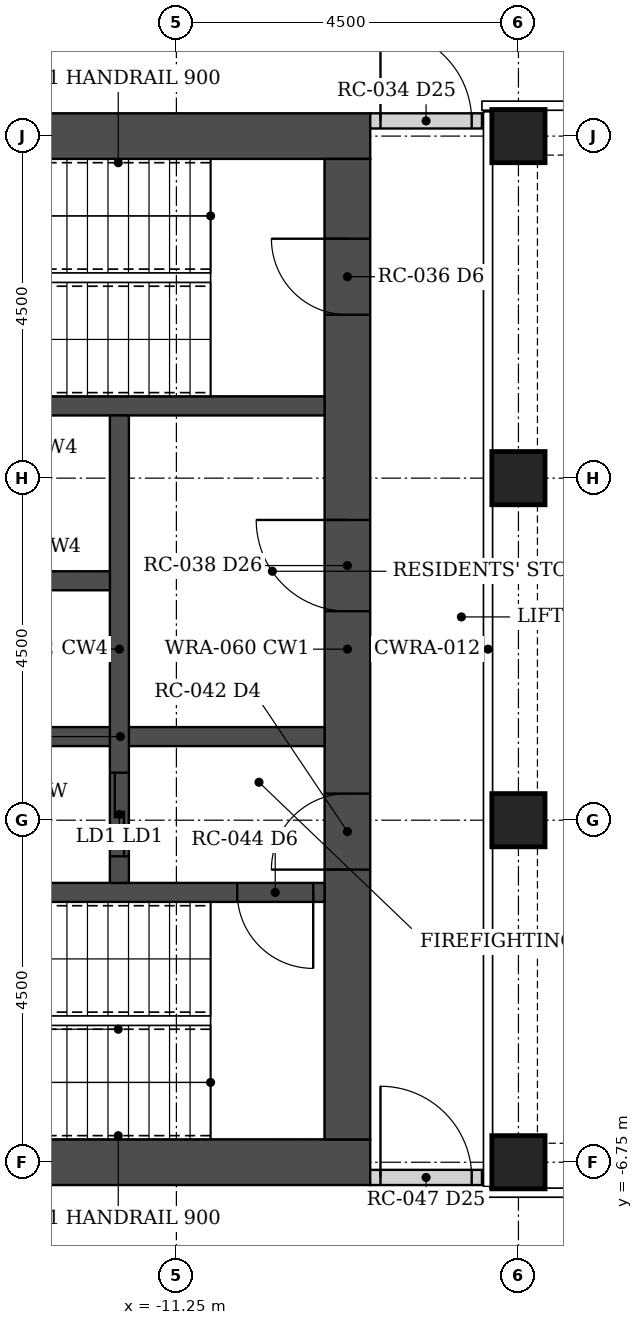
"""IFC4 building model, lengths in metres.
Left out: names, types, materials, properties, quantities, classifications, styles, units other than length and angle.
Written with IfcOpenShell. Run it as: python <this file> out.ifc"""

import sys

from ifc_helpers import new_model, si_unit, direction, frame, frame_2d, origin, origin_2d, place, context, subcontext, project, spatial, rectangle, hollow_rectangle, extrude, element, fill, save


model = new_model("IFC4")
c1 = context("Model", 3, precision=1e-05, world=origin(), true_north=direction((0.0, 1.0)))
c2 = subcontext(c1, "Body", "Model", "MODEL_VIEW")
j1 = project(units=[si_unit("LENGTHUNIT", "METRE"), si_unit("PLANEANGLEUNIT", "RADIAN")], contexts=[c1])
p1 = place(None, origin())
s1 = spatial("IfcSite", under=j1, at=p1, CompositionType="ELEMENT")
p2 = place(p1, origin())
s2 = spatial("IfcBuilding", under=s1, at=p2, CompositionType="ELEMENT")
p3 = place(p2, frame((0.0, 0.0, 47.5)))
s3 = spatial("IfcBuildingStorey", under=s2, at=p3, CompositionType="ELEMENT", Elevation=47.5)
for number, where, z_axis, x_axis in (
    (1, (-6.75, -6.75, 0.0), (0.0, 0.0, 1.0), (1.0, 0.0, 0.0)),
    (2, (-6.75, -2.25, 0.0), (0.0, 0.0, 1.0), (1.0, 0.0, 0.0)),
    (3, (-6.75, 2.25, 0.0), (0.0, 0.0, 1.0), (1.0, 0.0, 0.0)),
    (4, (-6.75, 6.75, 0.0), (0.0, 0.0, 1.0), (1.0, 0.0, 0.0)),
):
    element("IfcColumn", number, at=place(p3, frame(where, z_axis=z_axis, x_axis=x_axis)), inside=s3, PredefinedType="COLUMN", context=c2, shape_type="SweptSolid", body=[
        extrude(hollow_rectangle(XDim=0.7, YDim=0.7, WallThickness=0.06, at=origin_2d()), origin(), (0.0, 0.0, 1.0), 3.5),
    ])
for number, where, z_axis, x_axis in (
    (5, (-8.7, -6.75, 0.0), (0.0, 0.0, 1.0), (-1.0, 0.0, 0.0)),
    (6, (-8.7, 6.75, 0.0), (0.0, 0.0, 1.0), (-1.0, 0.0, 0.0)),
):
    element("IfcWall", number, at=place(p3, frame(where, z_axis=z_axis, x_axis=x_axis)), inside=s3, PredefinedType="SHEAR", context=c2, shape_type="SweptSolid", body=[
        extrude(rectangle(XDim=9.6, YDim=0.6, at=frame_2d((4.8, 0.0))), origin(), (0.0, 0.0, 1.0), 3.5),
    ])
p4 = place(p3, frame((-9.0, -6.45, 0.0), z_axis=(0.0, 0.0, 1.0), x_axis=(0.0, 1.0, 0.0)))
e7 = element("IfcWall", 7, at=p4, inside=s3, PredefinedType="SHEAR", context=c2, shape_type="SweptSolid", body=[
    extrude(rectangle(XDim=12.9, YDim=0.6, at=frame_2d((6.45, 0.0))), origin(), (0.0, 0.0, 1.0), 3.5),
])
p5 = place(p4, frame((3.55, 0.0, 0.0)))
e8 = element("IfcOpeningElement", 8, at=p5, cuts=e7, PredefinedType="OPENING", context=c2, shape_type="SweptSolid", body=[
    extrude(rectangle(XDim=1.0, YDim=2.1, at=frame_2d((0.5, 1.05))), frame((0.0, 0.31, 0.0), z_axis=(0.0, -1.0, 0.0), x_axis=(1.0, 0.0, 0.0)), (0.0, 0.0, 1.0), 0.62),
])
p6 = place(p4, frame((6.95, 0.0, 0.0)))
e9 = element("IfcOpeningElement", 9, at=p6, cuts=e7, PredefinedType="OPENING", context=c2, shape_type="SweptSolid", body=[
    extrude(rectangle(XDim=1.2, YDim=2.1, at=frame_2d((0.6, 1.05))), frame((0.0, 0.31, 0.0), z_axis=(0.0, -1.0, 0.0), x_axis=(1.0, 0.0, 0.0)), (0.0, 0.0, 1.0), 0.62),
])
p7 = place(p4, frame((10.85, 0.0, 0.0)))
e10 = element("IfcOpeningElement", 10, at=p7, cuts=e7, PredefinedType="OPENING", context=c2, shape_type="SweptSolid", body=[
    extrude(rectangle(XDim=1.0, YDim=2.1, at=frame_2d((0.5, 1.05))), frame((0.0, 0.31, 0.0), z_axis=(0.0, -1.0, 0.0), x_axis=(1.0, 0.0, 0.0)), (0.0, 0.0, 1.0), 0.62),
])
p8 = place(p3, frame((-9.3, -3.2, 0.0), z_axis=(0.0, 0.0, 1.0), x_axis=(-1.0, 0.0, 0.0)))
e11 = element("IfcWall", 11, at=p8, inside=s3, PredefinedType="SHEAR", context=c2, shape_type="SweptSolid", body=[
    extrude(rectangle(XDim=8.4, YDim=0.25, at=frame_2d((4.2, 0.0))), origin(), (0.0, 0.0, 1.0), 3.5),
])
p9 = place(p8, frame((0.15, 0.0, 0.0)))
e12 = element("IfcOpeningElement", 12, at=p9, cuts=e11, PredefinedType="OPENING", context=c2, shape_type="SweptSolid", body=[
    extrude(rectangle(XDim=1.0, YDim=2.1, at=frame_2d((0.5, 1.05))), frame((0.0, 0.135, 0.0), z_axis=(0.0, -1.0, 0.0), x_axis=(1.0, 0.0, 0.0)), (0.0, 0.0, 1.0), 0.27),
])
p10 = place(p3, frame((-9.3, 3.2, 0.0), z_axis=(0.0, 0.0, 1.0), x_axis=(-1.0, 0.0, 0.0)))
e13 = element("IfcWall", 13, at=p10, inside=s3, PredefinedType="SHEAR", context=c2, shape_type="SweptSolid", body=[
    extrude(rectangle(XDim=8.4, YDim=0.25, at=frame_2d((4.2, 0.0))), origin(), (0.0, 0.0, 1.0), 3.5),
])
p11 = place(p3, frame((-9.3, -1.15, 0.0), z_axis=(0.0, 0.0, 1.0), x_axis=(-1.0, 0.0, 0.0)))
e14 = element("IfcWall", 14, at=p11, inside=s3, PredefinedType="SHEAR", context=c2, shape_type="SweptSolid", body=[
    extrude(rectangle(XDim=5.375, YDim=0.25, at=frame_2d((2.688, 0.0))), origin(), (0.0, 0.0, 1.0), 3.5),
])
p12 = place(p3, frame((-12.0, -3.075, 0.0), z_axis=(0.0, 0.0, 1.0), x_axis=(0.0, 1.0, 0.0)))
e15 = element("IfcWall", 15, at=p12, inside=s3, PredefinedType="SHEAR", context=c2, shape_type="SweptSolid", body=[
    extrude(rectangle(XDim=6.15, YDim=0.25, at=frame_2d((3.075, 0.0))), origin(), (0.0, 0.0, 1.0), 3.5),
])
p13 = place(p12, frame((0.35, 0.0, 0.0)))
e16 = element("IfcOpeningElement", 16, at=p13, cuts=e15, PredefinedType="OPENING", context=c2, shape_type="SweptSolid", body=[
    extrude(rectangle(XDim=1.1, YDim=2.1, at=frame_2d((0.55, 1.05))), frame((0.0, 0.135, 0.0), z_axis=(0.0, -1.0, 0.0), x_axis=(1.0, 0.0, 0.0)), (0.0, 0.0, 1.0), 0.27),
])
p14 = place(p3, frame((-12.125, 0.9, 0.0), z_axis=(0.0, 0.0, 1.0), x_axis=(-1.0, 0.0, 0.0)))
e17 = element("IfcWall", 17, at=p14, inside=s3, PredefinedType="SHEAR", context=c2, shape_type="SweptSolid", body=[
    extrude(rectangle(XDim=2.55, YDim=0.25, at=frame_2d((1.275, 0.0))), origin(), (0.0, 0.0, 1.0), 3.5),
])
p15 = place(p3, frame((-8.7, 6.95, 0.0), z_axis=(0.0, 0.0, 1.0), x_axis=(1.0, 0.0, 0.0)))
e18 = element("IfcWall", 18, at=p15, inside=s3, PredefinedType="PARTITIONING", context=c2, shape_type="SweptSolid", body=[
    extrude(rectangle(XDim=1.47, YDim=0.2, at=frame_2d((0.735, 0.0))), origin(), (0.0, 0.0, 1.0), 2.373),
])
p16 = place(p15, frame((0.135, 0.0, 0.0)))
e19 = element("IfcOpeningElement", 19, at=p16, cuts=e18, PredefinedType="OPENING", context=c2, shape_type="SweptSolid", body=[
    extrude(rectangle(XDim=1.2, YDim=2.1, at=frame_2d((0.6, 1.05))), frame((0.0, 0.11, 0.0), z_axis=(0.0, -1.0, 0.0), x_axis=(1.0, 0.0, 0.0)), (0.0, 0.0, 1.0), 0.22),
])
p17 = place(p3, frame((-8.7, -6.95, 0.0), z_axis=(0.0, 0.0, 1.0), x_axis=(1.0, 0.0, 0.0)))
e20 = element("IfcWall", 20, at=p17, inside=s3, PredefinedType="PARTITIONING", context=c2, shape_type="SweptSolid", body=[
    extrude(rectangle(XDim=1.47, YDim=0.2, at=frame_2d((0.735, 0.0))), origin(), (0.0, 0.0, 1.0), 2.373),
])
p18 = place(p17, frame((0.135, 0.0, 0.0)))
e21 = element("IfcOpeningElement", 21, at=p18, cuts=e20, PredefinedType="OPENING", context=c2, shape_type="SweptSolid", body=[
    extrude(rectangle(XDim=1.2, YDim=2.1, at=frame_2d((0.6, 1.05))), frame((0.0, 0.11, 0.0), z_axis=(0.0, -1.0, 0.0), x_axis=(1.0, 0.0, 0.0)), (0.0, 0.0, 1.0), 0.22),
])
p19 = place(p16, origin())
e22 = element("IfcDoor", 22, at=p19, inside=s3, OperationType="DOUBLE_DOOR_DOUBLE_SWING", PredefinedType="DOOR", context=c2, shape_type="SweptSolid", body=[
    extrude(rectangle(XDim=1.2, YDim=2.1, at=frame_2d((0.6, 1.05))), frame((0.0, 0.025, 0.0), z_axis=(0.0, -1.0, 0.0), x_axis=(1.0, 0.0, 0.0)), (0.0, 0.0, 1.0), 0.05),
])
fill(e19, e22)
p20 = place(p18, origin())
e23 = element("IfcDoor", 23, at=p20, inside=s3, OperationType="DOUBLE_DOOR_DOUBLE_SWING", PredefinedType="DOOR", context=c2, shape_type="SweptSolid", body=[
    extrude(rectangle(XDim=1.2, YDim=2.1, at=frame_2d((0.6, 1.05))), frame((0.0, 0.025, 0.0), z_axis=(0.0, -1.0, 0.0), x_axis=(1.0, 0.0, 0.0)), (0.0, 0.0, 1.0), 0.05),
])
fill(e21, e23)
p21 = place(p5, origin())
e24 = element("IfcDoor", 24, at=p21, inside=s3, OperationType="SINGLE_SWING_LEFT", PredefinedType="DOOR", context=c2, shape_type="SweptSolid", body=[
    extrude(rectangle(XDim=1.0, YDim=2.1, at=frame_2d((0.5, 1.05))), frame((0.0, 0.025, 0.0), z_axis=(0.0, -1.0, 0.0), x_axis=(1.0, 0.0, 0.0)), (0.0, 0.0, 1.0), 0.05),
])
fill(e8, e24)
p22 = place(p9, origin())
e25 = element("IfcDoor", 25, at=p22, inside=s3, OperationType="SINGLE_SWING_LEFT", PredefinedType="DOOR", context=c2, shape_type="SweptSolid", body=[
    extrude(rectangle(XDim=1.0, YDim=2.1, at=frame_2d((0.5, 1.05))), frame((0.0, 0.025, 0.0), z_axis=(0.0, -1.0, 0.0), x_axis=(1.0, 0.0, 0.0)), (0.0, 0.0, 1.0), 0.05),
])
fill(e12, e25)
p23 = place(p6, origin())
e26 = element("IfcDoor", 26, at=p23, inside=s3, OperationType="SINGLE_SWING_RIGHT", PredefinedType="DOOR", context=c2, shape_type="SweptSolid", body=[
    extrude(rectangle(XDim=1.2, YDim=2.1, at=frame_2d((0.6, 1.05))), frame((0.0, 0.025, 0.0), z_axis=(0.0, -1.0, 0.0), x_axis=(1.0, 0.0, 0.0)), (0.0, 0.0, 1.0), 0.05),
])
fill(e9, e26)
p24 = place(p7, origin())
e27 = element("IfcDoor", 27, at=p24, inside=s3, OperationType="SINGLE_SWING_RIGHT", PredefinedType="DOOR", context=c2, shape_type="SweptSolid", body=[
    extrude(rectangle(XDim=1.0, YDim=2.1, at=frame_2d((0.5, 1.05))), frame((0.0, 0.025, 0.0), z_axis=(0.0, -1.0, 0.0), x_axis=(1.0, 0.0, 0.0)), (0.0, 0.0, 1.0), 0.05),
])
fill(e10, e27)
p25 = place(p13, origin())
e28 = element("IfcDoor", 28, at=p25, inside=s3, OperationType="DOUBLE_DOOR_SLIDING", PredefinedType="DOOR", context=c2, shape_type="SweptSolid", body=[
    extrude(rectangle(XDim=1.1, YDim=2.1, at=frame_2d((0.55, 1.05))), frame((0.0, 0.025, 0.0), z_axis=(0.0, -1.0, 0.0), x_axis=(1.0, 0.0, 0.0)), (0.0, 0.0, 1.0), 0.05),
])
fill(e16, e28)
save(model, sys.argv[1])
